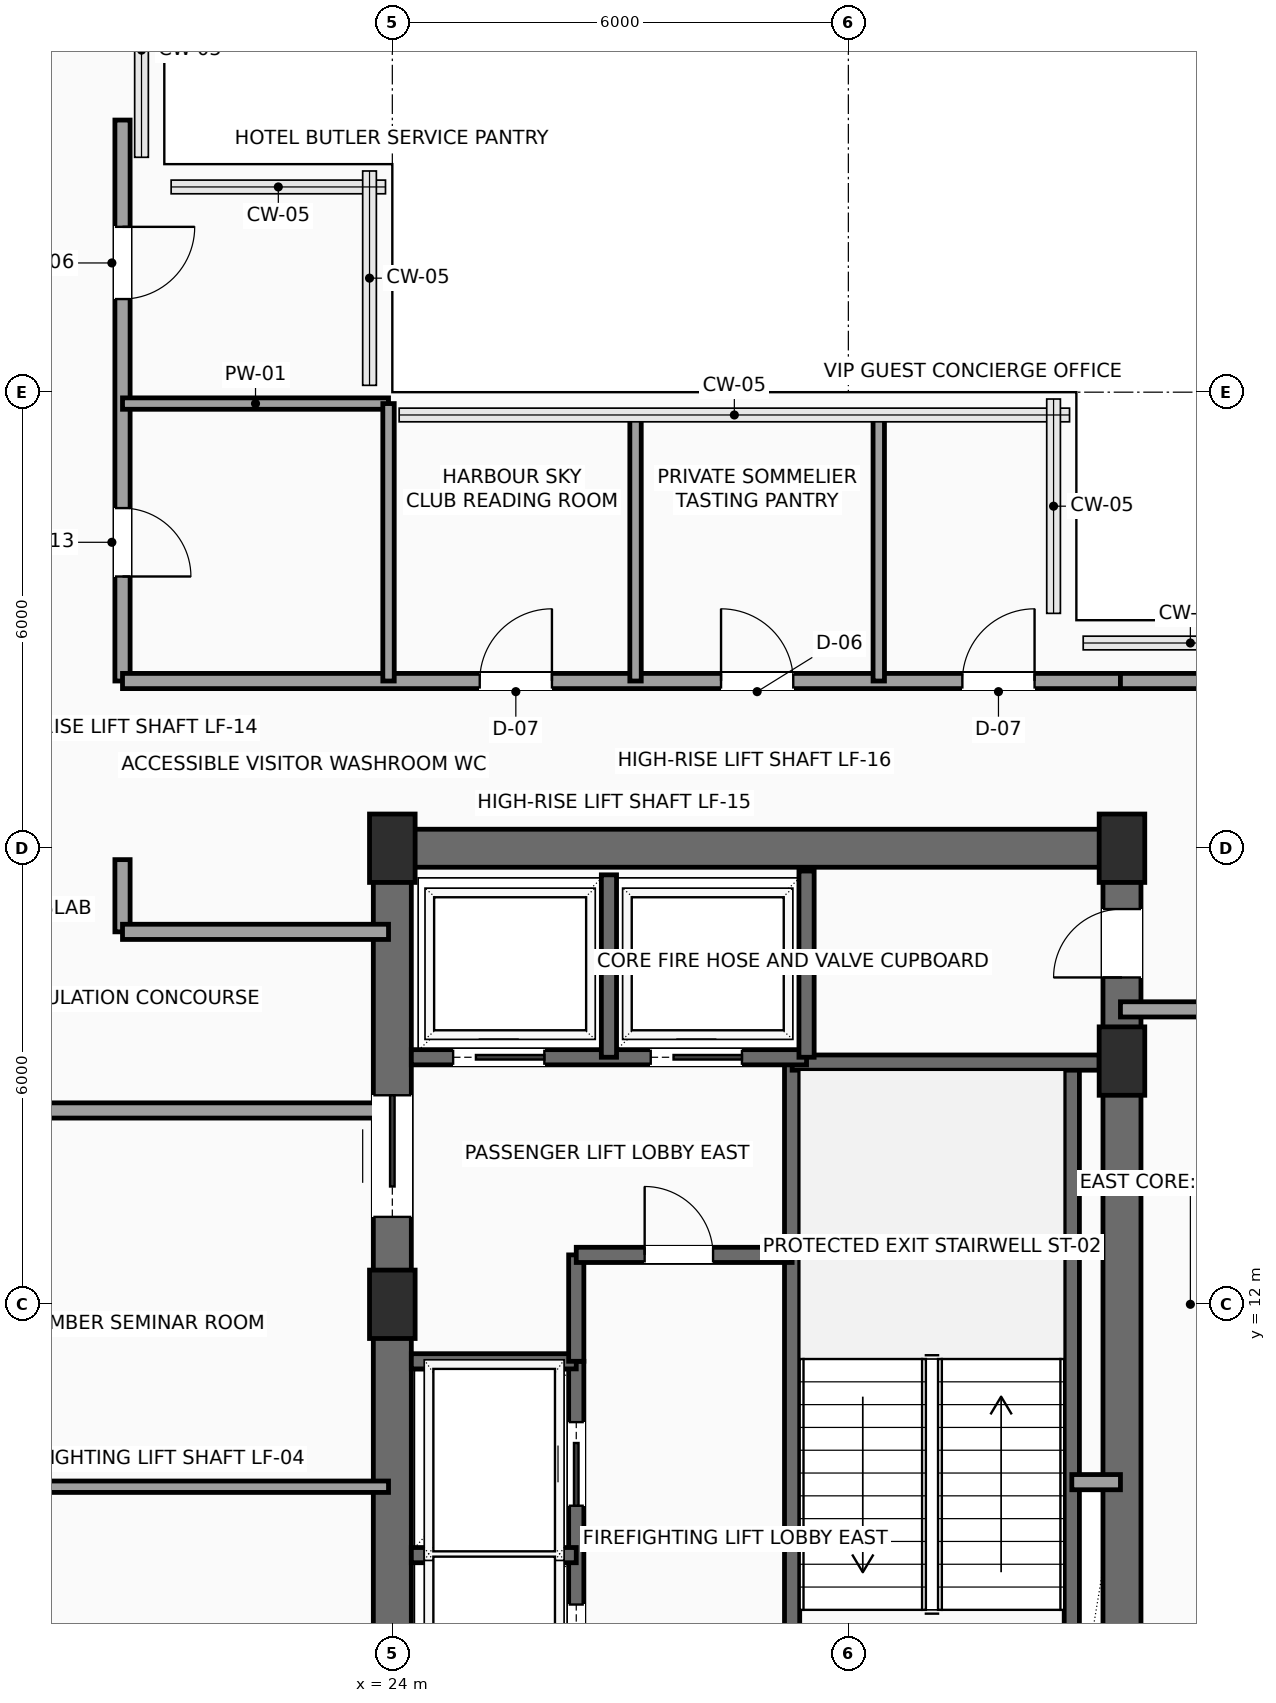
"""IFC4 building model, lengths in metres.
Left out: names, types, materials, properties, quantities, classifications, styles, units other than length and angle.
Written with IfcOpenShell. Run it as: python <this file> out.ifc"""

import sys

from ifc_helpers import new_model, si_unit, direction, frame, frame_2d, origin, origin_2d, place, context, subcontext, project, spatial, rectangle, extrude, element, fill, save


model = new_model("IFC4")
c1 = context("Model", 3, precision=1e-05, world=origin(), true_north=direction((0.0, 1.0)))
c2 = subcontext(c1, "Body", "Model", "MODEL_VIEW")
j1 = project(units=[si_unit("LENGTHUNIT", "METRE"), si_unit("PLANEANGLEUNIT", "RADIAN")], contexts=[c1])
p1 = place(None, origin())
s1 = spatial("IfcSite", under=j1, at=p1, CompositionType="ELEMENT")
p2 = place(p1, origin())
s2 = spatial("IfcBuilding", under=s1, at=p2, CompositionType="ELEMENT")
p3 = place(p2, frame((0.0, 0.0, 271.2)))
s3 = spatial("IfcBuildingStorey", under=s2, at=p3, CompositionType="ELEMENT", Elevation=271.2)
for number, where, z_axis, x_axis in (
    (1, (24.0, 12.0, 0.0), (0.0, 0.0, 1.0), (1.0, 0.0, 0.0)),
    (2, (24.0, 18.0, 0.0), (0.0, 0.0, 1.0), (1.0, 0.0, 0.0)),
    (3, (33.6, 15.2, 0.0), (0.0, 0.0, 1.0), (1.0, 0.0, 0.0)),
    (4, (33.6, 18.0, 0.0), (0.0, 0.0, 1.0), (1.0, 0.0, 0.0)),
):
    element("IfcColumn", number, at=place(p3, frame(where, z_axis=z_axis, x_axis=x_axis)), inside=s3, PredefinedType="COLUMN", context=c2, shape_type="SweptSolid", body=[
        extrude(rectangle(XDim=0.6, YDim=0.9, at=origin_2d()), origin(), (0.0, 0.0, 1.0), 3.5),
    ])
p4 = place(p3, frame((24.0, 18.0, 0.0), z_axis=(0.0, 0.0, 1.0), x_axis=(1.0, 0.0, 0.0)))
e5 = element("IfcWall", 5, at=p4, inside=s3, PredefinedType="SHEAR", context=c2, shape_type="SweptSolid", body=[
    extrude(rectangle(XDim=9.6, YDim=0.5, at=frame_2d((4.8, 0.0))), origin(), (0.0, 0.0, 1.0), 3.3),
])
p5 = place(p3, frame((24.0, 6.0, 0.0), z_axis=(0.0, 0.0, 1.0), x_axis=(0.0, 1.0, 0.0)))
e6 = element("IfcWall", 6, at=p5, inside=s3, PredefinedType="SHEAR", context=c2, shape_type="SweptSolid", body=[
    extrude(rectangle(XDim=12.0, YDim=0.5, at=frame_2d((6.0, 0.0))), origin(), (0.0, 0.0, 1.0), 3.3),
])
p6 = place(p5, frame((7.15, 0.0, 0.0)))
e7 = element("IfcOpeningElement", 7, at=p6, cuts=e6, PredefinedType="OPENING", context=c2, shape_type="SweptSolid", body=[
    extrude(rectangle(XDim=1.6, YDim=2.3, at=frame_2d((0.8, 1.15))), frame((0.0, 0.26, 0.0), z_axis=(0.0, -1.0, 0.0), x_axis=(1.0, 0.0, 0.0)), (0.0, 0.0, 1.0), 0.52),
])
p7 = place(p3, frame((33.6, 6.0, 0.0), z_axis=(0.0, 0.0, 1.0), x_axis=(0.0, 1.0, 0.0)))
e8 = element("IfcWall", 8, at=p7, inside=s3, PredefinedType="SHEAR", context=c2, shape_type="SweptSolid", body=[
    extrude(rectangle(XDim=12.0, YDim=0.5, at=frame_2d((6.0, 0.0))), origin(), (0.0, 0.0, 1.0), 3.3),
])
p8 = place(p7, frame((10.3, 0.0, 0.0)))
e9 = element("IfcOpeningElement", 9, at=p8, cuts=e8, PredefinedType="OPENING", context=c2, shape_type="SweptSolid", body=[
    extrude(rectangle(XDim=0.9, YDim=2.15, at=frame_2d((0.45, 1.075))), frame((0.0, 0.26, 0.0), z_axis=(0.0, -1.0, 0.0), x_axis=(1.0, 0.0, 0.0)), (0.0, 0.0, 1.0), 0.52),
])
p9 = place(p3, frame((29.26, 6.3, 0.0), z_axis=(0.0, 0.0, 1.0), x_axis=(0.0, 1.0, 0.0)))
e10 = element("IfcWall", 10, at=p9, inside=s3, PredefinedType="SHEAR", context=c2, shape_type="SweptSolid", body=[
    extrude(rectangle(XDim=8.88, YDim=0.2, at=frame_2d((4.44, 0.0))), origin(), (0.0, 0.0, 1.0), 3.3),
])
p10 = place(p9, frame((0.35, 0.0, 0.0)))
e11 = element("IfcOpeningElement", 11, at=p10, cuts=e10, PredefinedType="OPENING", context=c2, shape_type="SweptSolid", body=[
    extrude(rectangle(XDim=1.1, YDim=2.2, at=frame_2d((0.55, 1.1))), frame((0.0, 0.11, 0.0), z_axis=(0.0, -1.0, 0.0), x_axis=(1.0, 0.0, 0.0)), (0.0, 0.0, 1.0), 0.22),
])
p11 = place(p3, frame((32.94, 6.3, 0.0), z_axis=(0.0, 0.0, 1.0), x_axis=(0.0, 1.0, 0.0)))
e12 = element("IfcWall", 12, at=p11, inside=s3, PredefinedType="SHEAR", context=c2, shape_type="SweptSolid", body=[
    extrude(rectangle(XDim=8.88, YDim=0.2, at=frame_2d((4.44, 0.0))), origin(), (0.0, 0.0, 1.0), 3.3),
])
p12 = place(p3, frame((29.26, 15.18, 0.0), z_axis=(0.0, 0.0, 1.0), x_axis=(1.0, 0.0, 0.0)))
e13 = element("IfcWall", 13, at=p12, inside=s3, PredefinedType="SHEAR", context=c2, shape_type="SweptSolid", body=[
    extrude(rectangle(XDim=4.04, YDim=0.2, at=frame_2d((2.02, 0.0))), origin(), (0.0, 0.0, 1.0), 3.3),
])
p13 = place(p3, frame((26.42, 6.3, 0.0), z_axis=(0.0, 0.0, 1.0), x_axis=(0.0, 1.0, 0.0)))
e14 = element("IfcWall", 14, at=p13, inside=s3, PredefinedType="SHEAR", context=c2, shape_type="SweptSolid", body=[
    extrude(rectangle(XDim=4.95, YDim=0.2, at=frame_2d((2.475, 0.0))), origin(), (0.0, 0.0, 1.0), 3.3),
])
p14 = place(p13, frame((0.65, 0.0, 0.0)))
e15 = element("IfcOpeningElement", 15, at=p14, cuts=e14, PredefinedType="OPENING", context=c2, shape_type="SweptSolid", body=[
    extrude(rectangle(XDim=1.1, YDim=2.2, at=frame_2d((0.55, 1.1))), frame((0.0, 0.11, 0.0), z_axis=(0.0, -1.0, 0.0), x_axis=(1.0, 0.0, 0.0)), (0.0, 0.0, 1.0), 0.22),
])
p15 = place(p13, frame((3.05, 0.0, 0.0)))
e16 = element("IfcOpeningElement", 16, at=p15, cuts=e14, PredefinedType="OPENING", context=c2, shape_type="SweptSolid", body=[
    extrude(rectangle(XDim=1.1, YDim=2.2, at=frame_2d((0.55, 1.1))), frame((0.0, 0.11, 0.0), z_axis=(0.0, -1.0, 0.0), x_axis=(1.0, 0.0, 0.0)), (0.0, 0.0, 1.0), 0.22),
])
for number, where, z_axis, x_axis in (
    (17, (24.25, 8.7, 0.0), (0.0, 0.0, 1.0), (1.0, 0.0, 0.0)),
    (18, (24.25, 11.25, 0.0), (0.0, 0.0, 1.0), (1.0, 0.0, 0.0)),
):
    element("IfcWall", number, at=place(p3, frame(where, z_axis=z_axis, x_axis=x_axis)), inside=s3, PredefinedType="SHEAR", context=c2, shape_type="SweptSolid", body=[
        extrude(rectangle(XDim=2.17, YDim=0.2, at=frame_2d((1.085, 0.0))), origin(), (0.0, 0.0, 1.0), 3.3),
    ])
p16 = place(p3, frame((26.42, 11.25, 0.0), z_axis=(0.0, 0.0, 1.0), x_axis=(0.0, 1.0, 0.0)))
e19 = element("IfcWall", 19, at=p16, inside=s3, PredefinedType="SHEAR", context=c2, shape_type="SweptSolid", body=[
    extrude(rectangle(XDim=1.4, YDim=0.2, at=frame_2d((0.7, 0.0))), origin(), (0.0, 0.0, 1.0), 3.3),
])
p17 = place(p3, frame((26.42, 12.65, 0.0), z_axis=(0.0, 0.0, 1.0), x_axis=(1.0, 0.0, 0.0)))
e20 = element("IfcWall", 20, at=p17, inside=s3, PredefinedType="SHEAR", context=c2, shape_type="SweptSolid", body=[
    extrude(rectangle(XDim=2.84, YDim=0.2, at=frame_2d((1.42, 0.0))), origin(), (0.0, 0.0, 1.0), 3.3),
])
p18 = place(p17, frame((0.9, 0.0, 0.0)))
e21 = element("IfcOpeningElement", 21, at=p18, cuts=e20, PredefinedType="OPENING", context=c2, shape_type="SweptSolid", body=[
    extrude(rectangle(XDim=0.9, YDim=2.15, at=frame_2d((0.45, 1.075))), frame((0.0, 0.11, 0.0), z_axis=(0.0, -1.0, 0.0), x_axis=(1.0, 0.0, 0.0)), (0.0, 0.0, 1.0), 0.22),
])
p19 = place(p3, frame((32.94, 9.66, 0.0), z_axis=(0.0, 0.0, 1.0), x_axis=(1.0, 0.0, 0.0)))
e22 = element("IfcWall", 22, at=p19, inside=s3, PredefinedType="SOLIDWALL", context=c2, shape_type="SweptSolid", body=[
    extrude(rectangle(XDim=0.64, YDim=0.2, at=frame_2d((0.32, 0.0))), origin(), (0.0, 0.0, 1.0), 3.3),
])
p20 = place(p3, frame((24.25, 15.25, 0.0), z_axis=(0.0, 0.0, 1.0), x_axis=(1.0, 0.0, 0.0)))
e23 = element("IfcWall", 23, at=p20, inside=s3, PredefinedType="SHEAR", context=c2, shape_type="SweptSolid", body=[
    extrude(rectangle(XDim=5.2, YDim=0.2, at=frame_2d((2.6, 0.0))), origin(), (0.0, 0.0, 1.0), 3.3),
])
p21 = place(p20, frame((0.55, 0.0, 0.0)))
e24 = element("IfcOpeningElement", 24, at=p21, cuts=e23, PredefinedType="OPENING", context=c2, shape_type="SweptSolid", body=[
    extrude(rectangle(XDim=1.2, YDim=2.2, at=frame_2d((0.6, 1.1))), frame((0.0, 0.11, 0.0), z_axis=(0.0, -1.0, 0.0), x_axis=(1.0, 0.0, 0.0)), (0.0, 0.0, 1.0), 0.22),
])
p22 = place(p20, frame((3.15, 0.0, 0.0)))
e25 = element("IfcOpeningElement", 25, at=p22, cuts=e23, PredefinedType="OPENING", context=c2, shape_type="SweptSolid", body=[
    extrude(rectangle(XDim=1.2, YDim=2.2, at=frame_2d((0.6, 1.1))), frame((0.0, 0.11, 0.0), z_axis=(0.0, -1.0, 0.0), x_axis=(1.0, 0.0, 0.0)), (0.0, 0.0, 1.0), 0.22),
])
p23 = place(p3, frame((26.85, 15.25, 0.0), z_axis=(0.0, 0.0, 1.0), x_axis=(0.0, 1.0, 0.0)))
e26 = element("IfcWall", 26, at=p23, inside=s3, PredefinedType="SHEAR", context=c2, shape_type="SweptSolid", body=[
    extrude(rectangle(XDim=2.4, YDim=0.2, at=frame_2d((1.2, 0.0))), origin(), (0.0, 0.0, 1.0), 3.3),
])
p24 = place(p3, frame((29.45, 15.25, 0.0), z_axis=(0.0, 0.0, 1.0), x_axis=(0.0, 1.0, 0.0)))
e27 = element("IfcWall", 27, at=p24, inside=s3, PredefinedType="SHEAR", context=c2, shape_type="SweptSolid", body=[
    extrude(rectangle(XDim=2.45, YDim=0.2, at=frame_2d((1.225, 0.0))), origin(), (0.0, 0.0, 1.0), 3.3),
])
p25 = place(p3, frame((20.45, 27.58, 0.0), z_axis=(0.0, 0.0, 1.0), x_axis=(0.0, -1.0, 0.0)))
e28 = element("IfcWall", 28, at=p25, inside=s3, PredefinedType="PARTITIONING", context=c2, shape_type="SweptSolid", body=[
    extrude(rectangle(XDim=7.38, YDim=0.2, at=frame_2d((3.69, 0.0))), origin(), (0.0, 0.0, 1.0), 3.3),
])
p26 = place(p25, frame((5.105, 0.0, 0.0)))
e29 = element("IfcOpeningElement", 29, at=p26, cuts=e28, PredefinedType="OPENING", context=c2, shape_type="SweptSolid", body=[
    extrude(rectangle(XDim=0.9, YDim=2.1, at=frame_2d((0.45, 1.05))), frame((0.0, 0.11, 0.0), z_axis=(0.0, -1.0, 0.0), x_axis=(1.0, 0.0, 0.0)), (0.0, 0.0, 1.0), 0.22),
])
p27 = place(p25, frame((1.405, 0.0, 0.0)))
e30 = element("IfcOpeningElement", 30, at=p27, cuts=e28, PredefinedType="OPENING", context=c2, shape_type="SweptSolid", body=[
    extrude(rectangle(XDim=0.95, YDim=2.15, at=frame_2d((0.475, 1.075))), frame((0.0, 0.11, 0.0), z_axis=(0.0, -1.0, 0.0), x_axis=(1.0, 0.0, 0.0)), (0.0, 0.0, 1.0), 0.22),
])
p28 = place(p3, frame((20.45, 20.2, 0.0), z_axis=(0.0, 0.0, 1.0), x_axis=(1.0, 0.0, 0.0)))
e31 = element("IfcWall", 31, at=p28, inside=s3, PredefinedType="PARTITIONING", context=c2, shape_type="SweptSolid", body=[
    extrude(rectangle(XDim=13.13, YDim=0.2, at=frame_2d((6.565, 0.0))), origin(), (0.0, 0.0, 1.0), 3.3),
])
p29 = place(p28, frame((4.7, 0.0, 0.0)))
e32 = element("IfcOpeningElement", 32, at=p29, cuts=e31, PredefinedType="OPENING", context=c2, shape_type="SweptSolid", body=[
    extrude(rectangle(XDim=0.95, YDim=2.15, at=frame_2d((0.475, 1.075))), frame((0.0, 0.11, 0.0), z_axis=(0.0, -1.0, 0.0), x_axis=(1.0, 0.0, 0.0)), (0.0, 0.0, 1.0), 0.22),
])
p30 = place(p28, frame((7.875, 0.0, 0.0)))
e33 = element("IfcOpeningElement", 33, at=p30, cuts=e31, PredefinedType="OPENING", context=c2, shape_type="SweptSolid", body=[
    extrude(rectangle(XDim=0.95, YDim=2.15, at=frame_2d((0.475, 1.075))), frame((0.0, 0.11, 0.0), z_axis=(0.0, -1.0, 0.0), x_axis=(1.0, 0.0, 0.0)), (0.0, 0.0, 1.0), 0.22),
])
p31 = place(p28, frame((11.05, 0.0, 0.0)))
e34 = element("IfcOpeningElement", 34, at=p31, cuts=e31, PredefinedType="OPENING", context=c2, shape_type="SweptSolid", body=[
    extrude(rectangle(XDim=0.95, YDim=2.15, at=frame_2d((0.475, 1.075))), frame((0.0, 0.11, 0.0), z_axis=(0.0, -1.0, 0.0), x_axis=(1.0, 0.0, 0.0)), (0.0, 0.0, 1.0), 0.22),
])
for number, where, z_axis, x_axis in (
    (35, (33.58, 20.2, 0.0), (0.0, 0.0, 1.0), (1.0, 0.0, 0.0)),
    (36, (35.7, 15.88, 0.0), (0.0, 0.0, 1.0), (-1.0, 0.0, 0.0)),
):
    element("IfcWall", number, at=place(p3, frame(where, z_axis=z_axis, x_axis=x_axis)), inside=s3, PredefinedType="PARTITIONING", context=c2, shape_type="SweptSolid", body=[
        extrude(rectangle(XDim=2.12, YDim=0.2, at=frame_2d((1.06, 0.0))), origin(), (0.0, 0.0, 1.0), 3.3),
    ])
p32 = place(p3, frame((20.45, 17.85, 0.0), z_axis=(0.0, 0.0, 1.0), x_axis=(0.0, -1.0, 0.0)))
e37 = element("IfcWall", 37, at=p32, inside=s3, PredefinedType="PARTITIONING", context=c2, shape_type="SweptSolid", body=[
    extrude(rectangle(XDim=0.95, YDim=0.2, at=frame_2d((0.475, 0.0))), origin(), (0.0, 0.0, 1.0), 3.3),
])
p33 = place(p3, frame((20.45, 16.9, 0.0), z_axis=(0.0, 0.0, 1.0), x_axis=(1.0, 0.0, 0.0)))
e38 = element("IfcWall", 38, at=p33, inside=s3, PredefinedType="PARTITIONING", context=c2, shape_type="SweptSolid", body=[
    extrude(rectangle(XDim=3.5, YDim=0.2, at=frame_2d((1.75, 0.0))), origin(), (0.0, 0.0, 1.0), 3.3),
])
p34 = place(p3, frame((23.95, 14.55, 0.0), z_axis=(0.0, 0.0, 1.0), x_axis=(-1.0, 0.0, 0.0)))
e39 = element("IfcWall", 39, at=p34, inside=s3, PredefinedType="PARTITIONING", context=c2, shape_type="SweptSolid", body=[
    extrude(rectangle(XDim=9.0, YDim=0.2, at=frame_2d((4.5, 0.0))), origin(), (0.0, 0.0, 1.0), 3.3),
])
p35 = place(p3, frame((20.45, 23.85, 0.0), z_axis=(0.0, 0.0, 1.0), x_axis=(1.0, 0.0, 0.0)))
e40 = element("IfcWall", 40, at=p35, inside=s3, PredefinedType="PARTITIONING", context=c2, shape_type="SweptSolid", body=[
    extrude(rectangle(XDim=3.5, YDim=0.15, at=frame_2d((1.75, 0.0))), origin(), (0.0, 0.0, 1.0), 3.3),
])
p36 = place(p3, frame((23.95, 20.2, 0.0), z_axis=(0.0, 0.0, 1.0), x_axis=(0.0, 1.0, 0.0)))
e41 = element("IfcWall", 41, at=p36, inside=s3, PredefinedType="PARTITIONING", context=c2, shape_type="SweptSolid", body=[
    extrude(rectangle(XDim=3.65, YDim=0.15, at=frame_2d((1.825, 0.0))), origin(), (0.0, 0.0, 1.0), 3.3),
])
for number, where, z_axis, x_axis in (
    (42, (27.2, 20.2, 0.0), (0.0, 0.0, 1.0), (0.0, 1.0, 0.0)),
    (43, (30.4, 20.2, 0.0), (0.0, 0.0, 1.0), (0.0, 1.0, 0.0)),
):
    element("IfcWall", number, at=place(p3, frame(where, z_axis=z_axis, x_axis=x_axis)), inside=s3, PredefinedType="PARTITIONING", context=c2, shape_type="SweptSolid", body=[
        extrude(rectangle(XDim=3.5, YDim=0.15, at=frame_2d((1.75, 0.0))), origin(), (0.0, 0.0, 1.0), 3.3),
    ])
p37 = place(p3, frame((14.95, 9.6, 0.0), z_axis=(0.0, 0.0, 1.0), x_axis=(1.0, 0.0, 0.0)))
e44 = element("IfcWall", 44, at=p37, inside=s3, PredefinedType="PARTITIONING", context=c2, shape_type="SweptSolid", body=[
    extrude(rectangle(XDim=9.0, YDim=0.15, at=frame_2d((4.5, 0.0))), origin(), (0.0, 0.0, 1.0), 3.3),
])
p38 = place(p6, origin())
e45 = element("IfcDoor", 45, at=p38, inside=s3, OperationType="DOUBLE_DOOR_SLIDING", PredefinedType="DOOR", context=c2, shape_type="SweptSolid", body=[
    extrude(rectangle(XDim=1.6, YDim=2.3, at=frame_2d((0.8, 1.15))), frame((0.0, 0.025, 0.0), z_axis=(0.0, -1.0, 0.0), x_axis=(1.0, 0.0, 0.0)), (0.0, 0.0, 1.0), 0.05),
])
fill(e7, e45)
p39 = place(p8, origin())
e46 = element("IfcDoor", 46, at=p39, inside=s3, OperationType="SINGLE_SWING_LEFT", PredefinedType="DOOR", context=c2, shape_type="SweptSolid", body=[
    extrude(rectangle(XDim=0.9, YDim=2.15, at=frame_2d((0.45, 1.075))), frame((0.0, 0.025, 0.0), z_axis=(0.0, -1.0, 0.0), x_axis=(1.0, 0.0, 0.0)), (0.0, 0.0, 1.0), 0.05),
])
fill(e9, e46)
p40 = place(p14, origin())
e47 = element("IfcDoor", 47, at=p40, inside=s3, OperationType="SLIDING_TO_LEFT", PredefinedType="DOOR", context=c2, shape_type="SweptSolid", body=[
    extrude(rectangle(XDim=1.1, YDim=2.2, at=frame_2d((0.55, 1.1))), frame((0.0, 0.025, 0.0), z_axis=(0.0, -1.0, 0.0), x_axis=(1.0, 0.0, 0.0)), (0.0, 0.0, 1.0), 0.05),
])
fill(e15, e47)
p41 = place(p15, origin())
e48 = element("IfcDoor", 48, at=p41, inside=s3, OperationType="SLIDING_TO_LEFT", PredefinedType="DOOR", context=c2, shape_type="SweptSolid", body=[
    extrude(rectangle(XDim=1.1, YDim=2.2, at=frame_2d((0.55, 1.1))), frame((0.0, 0.025, 0.0), z_axis=(0.0, -1.0, 0.0), x_axis=(1.0, 0.0, 0.0)), (0.0, 0.0, 1.0), 0.05),
])
fill(e16, e48)
p42 = place(p18, origin())
e49 = element("IfcDoor", 49, at=p42, inside=s3, OperationType="SINGLE_SWING_LEFT", PredefinedType="DOOR", context=c2, shape_type="SweptSolid", body=[
    extrude(rectangle(XDim=0.9, YDim=2.15, at=frame_2d((0.45, 1.075))), frame((0.0, 0.025, 0.0), z_axis=(0.0, -1.0, 0.0), x_axis=(1.0, 0.0, 0.0)), (0.0, 0.0, 1.0), 0.05),
])
fill(e21, e49)
p43 = place(p21, origin())
e50 = element("IfcDoor", 50, at=p43, inside=s3, OperationType="SLIDING_TO_RIGHT", PredefinedType="DOOR", context=c2, shape_type="SweptSolid", body=[
    extrude(rectangle(XDim=1.2, YDim=2.2, at=frame_2d((0.6, 1.1))), frame((0.0, 0.025, 0.0), z_axis=(0.0, -1.0, 0.0), x_axis=(1.0, 0.0, 0.0)), (0.0, 0.0, 1.0), 0.05),
])
fill(e24, e50)
p44 = place(p22, origin())
e51 = element("IfcDoor", 51, at=p44, inside=s3, OperationType="SLIDING_TO_RIGHT", PredefinedType="DOOR", context=c2, shape_type="SweptSolid", body=[
    extrude(rectangle(XDim=1.2, YDim=2.2, at=frame_2d((0.6, 1.1))), frame((0.0, 0.025, 0.0), z_axis=(0.0, -1.0, 0.0), x_axis=(1.0, 0.0, 0.0)), (0.0, 0.0, 1.0), 0.05),
])
fill(e25, e51)
p45 = place(p26, origin())
e52 = element("IfcDoor", 52, at=p45, inside=s3, OperationType="SINGLE_SWING_RIGHT", PredefinedType="DOOR", context=c2, shape_type="SweptSolid", body=[
    extrude(rectangle(XDim=0.9, YDim=2.1, at=frame_2d((0.45, 1.05))), frame((0.0, 0.025, 0.0), z_axis=(0.0, -1.0, 0.0), x_axis=(1.0, 0.0, 0.0)), (0.0, 0.0, 1.0), 0.05),
])
fill(e29, e52)
p46 = place(p27, origin())
e53 = element("IfcDoor", 53, at=p46, inside=s3, OperationType="SINGLE_SWING_LEFT", PredefinedType="DOOR", context=c2, shape_type="SweptSolid", body=[
    extrude(rectangle(XDim=0.95, YDim=2.15, at=frame_2d((0.475, 1.075))), frame((0.0, 0.025, 0.0), z_axis=(0.0, -1.0, 0.0), x_axis=(1.0, 0.0, 0.0)), (0.0, 0.0, 1.0), 0.05),
])
fill(e30, e53)
p47 = place(p29, origin())
e54 = element("IfcDoor", 54, at=p47, inside=s3, OperationType="SINGLE_SWING_RIGHT", PredefinedType="DOOR", context=c2, shape_type="SweptSolid", body=[
    extrude(rectangle(XDim=0.95, YDim=2.15, at=frame_2d((0.475, 1.075))), frame((0.0, 0.025, 0.0), z_axis=(0.0, -1.0, 0.0), x_axis=(1.0, 0.0, 0.0)), (0.0, 0.0, 1.0), 0.05),
])
fill(e32, e54)
p48 = place(p30, origin())
e55 = element("IfcDoor", 55, at=p48, inside=s3, OperationType="SINGLE_SWING_LEFT", PredefinedType="DOOR", context=c2, shape_type="SweptSolid", body=[
    extrude(rectangle(XDim=0.95, YDim=2.15, at=frame_2d((0.475, 1.075))), frame((0.0, 0.025, 0.0), z_axis=(0.0, -1.0, 0.0), x_axis=(1.0, 0.0, 0.0)), (0.0, 0.0, 1.0), 0.05),
])
fill(e33, e55)
p49 = place(p31, origin())
e56 = element("IfcDoor", 56, at=p49, inside=s3, OperationType="SINGLE_SWING_RIGHT", PredefinedType="DOOR", context=c2, shape_type="SweptSolid", body=[
    extrude(rectangle(XDim=0.95, YDim=2.15, at=frame_2d((0.475, 1.075))), frame((0.0, 0.025, 0.0), z_axis=(0.0, -1.0, 0.0), x_axis=(1.0, 0.0, 0.0)), (0.0, 0.0, 1.0), 0.05),
])
fill(e34, e56)
save(model, sys.argv[1])
